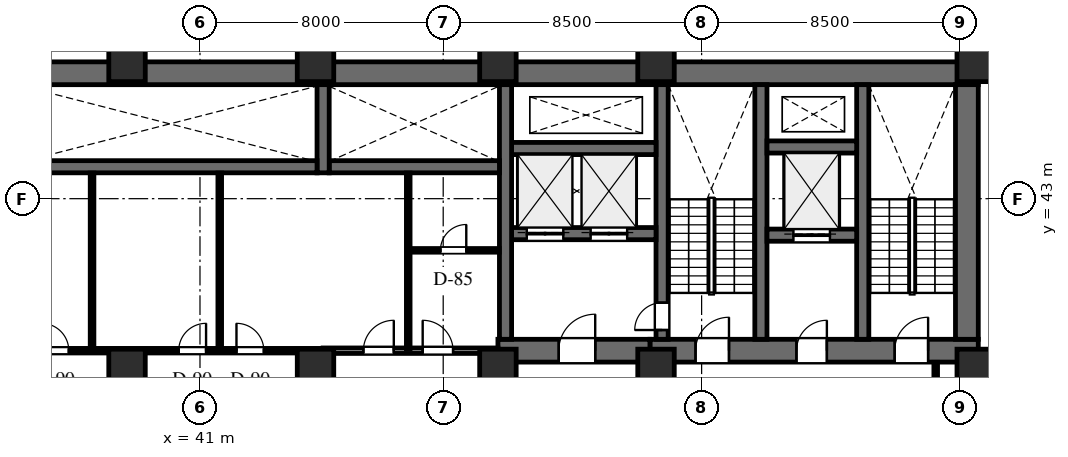
"""IFC4 building model, lengths in metres.
Left out: names, types, materials, properties, quantities, classifications, styles, units other than length and angle.
Written with IfcOpenShell. Run it as: python <this file> out.ifc"""

import sys

from ifc_helpers import new_model, si_unit, direction, frame, frame_2d, origin, origin_2d, place, context, subcontext, project, spatial, rectangle, extrude, element, fill, save


model = new_model("IFC4")
c1 = context("Model", 3, precision=1e-05, world=origin(), true_north=direction((0.0, 1.0)))
c2 = subcontext(c1, "Body", "Model", "MODEL_VIEW")
j1 = project(units=[si_unit("LENGTHUNIT", "METRE"), si_unit("PLANEANGLEUNIT", "RADIAN")], contexts=[c1])
p1 = place(None, origin())
s1 = spatial("IfcSite", under=j1, at=p1, CompositionType="ELEMENT")
p2 = place(p1, origin())
s2 = spatial("IfcBuilding", under=s1, at=p2, CompositionType="ELEMENT")
p3 = place(p2, frame((0.0, 0.0, 45.5)))
s3 = spatial("IfcBuildingStorey", under=s2, at=p3, CompositionType="ELEMENT", Elevation=45.5)
p4 = place(p3, frame((22.9, 47.125, 0.0), z_axis=(0.0, 0.0, 1.0), x_axis=(1.0, 0.0, 0.0)))
e1 = element("IfcWall", 1, at=p4, inside=s3, PredefinedType="SHEAR", context=c2, shape_type="SweptSolid", body=[
    extrude(rectangle(XDim=43.7, YDim=0.75, at=frame_2d((21.85, 0.0))), origin(), (0.0, 0.0, 1.0), 4.0),
])
p5 = place(p3, frame((55.8, 38.0, 0.0), z_axis=(0.0, 0.0, 1.0), x_axis=(1.0, 0.0, 0.0)))
e2 = element("IfcWall", 2, at=p5, inside=s3, PredefinedType="SHEAR", context=c2, shape_type="SweptSolid", body=[
    extrude(rectangle(XDim=10.8, YDim=0.75, at=frame_2d((5.4, 0.0))), origin(), (0.0, 0.0, 1.0), 4.0),
])
p6 = place(p5, frame((1.5, 0.0, 0.0)))
e3 = element("IfcOpeningElement", 3, at=p6, cuts=e2, PredefinedType="OPENING", context=c2, shape_type="SweptSolid", body=[
    extrude(rectangle(XDim=1.1, YDim=2.2, at=frame_2d((0.55, 1.1))), frame((0.0, 0.385, 0.0), z_axis=(0.0, -1.0, 0.0), x_axis=(1.0, 0.0, 0.0)), (0.0, 0.0, 1.0), 0.77),
])
p7 = place(p5, frame((4.82, 0.0, 0.0)))
e4 = element("IfcOpeningElement", 4, at=p7, cuts=e2, PredefinedType="OPENING", context=c2, shape_type="SweptSolid", body=[
    extrude(rectangle(XDim=1.0, YDim=2.15, at=frame_2d((0.5, 1.075))), frame((0.0, 0.385, 0.0), z_axis=(0.0, -1.0, 0.0), x_axis=(1.0, 0.0, 0.0)), (0.0, 0.0, 1.0), 0.77),
])
p8 = place(p5, frame((8.05, 0.0, 0.0)))
e5 = element("IfcOpeningElement", 5, at=p8, cuts=e2, PredefinedType="OPENING", context=c2, shape_type="SweptSolid", body=[
    extrude(rectangle(XDim=1.1, YDim=2.2, at=frame_2d((0.55, 1.1))), frame((0.0, 0.385, 0.0), z_axis=(0.0, -1.0, 0.0), x_axis=(1.0, 0.0, 0.0)), (0.0, 0.0, 1.0), 0.77),
])
p9 = place(p3, frame((66.225, 38.375, 0.0), z_axis=(0.0, 0.0, 1.0), x_axis=(0.0, 1.0, 0.0)))
e6 = element("IfcWall", 6, at=p9, inside=s3, PredefinedType="SHEAR", context=c2, shape_type="SweptSolid", body=[
    extrude(rectangle(XDim=8.375, YDim=0.75, at=frame_2d((4.188, 0.0))), origin(), (0.0, 0.0, 1.0), 4.0),
])
for number, where, z_axis, x_axis in (
    (7, (62.8, 38.375, 0.0), (0.0, 0.0, 1.0), (0.0, 1.0, 0.0)),
    (8, (59.45, 38.375, 0.0), (0.0, 0.0, 1.0), (0.0, 1.0, 0.0)),
):
    element("IfcWall", number, at=place(p3, frame(where, z_axis=z_axis, x_axis=x_axis)), inside=s3, PredefinedType="SHEAR", context=c2, shape_type="SweptSolid", body=[
        extrude(rectangle(XDim=8.375, YDim=0.4, at=frame_2d((4.188, 0.0))), origin(), (0.0, 0.0, 1.0), 4.0),
    ])
p10 = place(p3, frame((56.2, 38.375, 0.0), z_axis=(0.0, 0.0, 1.0), x_axis=(0.0, 1.0, 0.0)))
e9 = element("IfcWall", 9, at=p10, inside=s3, PredefinedType="SHEAR", context=c2, shape_type="SweptSolid", body=[
    extrude(rectangle(XDim=8.375, YDim=0.4, at=frame_2d((4.188, 0.0))), origin(), (0.0, 0.0, 1.0), 4.0),
])
p11 = place(p10, frame((0.305, 0.0, 0.0)))
e10 = element("IfcOpeningElement", 10, at=p11, cuts=e9, PredefinedType="OPENING", context=c2, shape_type="SweptSolid", body=[
    extrude(rectangle(XDim=0.9, YDim=2.15, at=frame_2d((0.45, 1.075))), frame((0.0, 0.21, 0.0), z_axis=(0.0, -1.0, 0.0), x_axis=(1.0, 0.0, 0.0)), (0.0, 0.0, 1.0), 0.42),
])
p12 = place(p3, frame((59.65, 41.8, 0.0), z_axis=(0.0, 0.0, 1.0), x_axis=(1.0, 0.0, 0.0)))
e11 = element("IfcWall", 11, at=p12, inside=s3, PredefinedType="SHEAR", context=c2, shape_type="SweptSolid", body=[
    extrude(rectangle(XDim=2.95, YDim=0.4, at=frame_2d((1.475, 0.0))), origin(), (0.0, 0.0, 1.0), 4.0),
])
p13 = place(p12, frame((0.87, 0.0, 0.0)))
e12 = element("IfcOpeningElement", 12, at=p13, cuts=e11, PredefinedType="OPENING", context=c2, shape_type="SweptSolid", body=[
    extrude(rectangle(XDim=1.2, YDim=2.2, at=frame_2d((0.6, 1.1))), frame((0.0, 0.21, 0.0), z_axis=(0.0, -1.0, 0.0), x_axis=(1.0, 0.0, 0.0)), (0.0, 0.0, 1.0), 0.42),
])
p14 = place(p3, frame((59.65, 44.7, 0.0), z_axis=(0.0, 0.0, 1.0), x_axis=(1.0, 0.0, 0.0)))
e13 = element("IfcWall", 13, at=p14, inside=s3, PredefinedType="SHEAR", context=c2, shape_type="SweptSolid", body=[
    extrude(rectangle(XDim=2.95, YDim=0.4, at=frame_2d((1.475, 0.0))), origin(), (0.0, 0.0, 1.0), 4.0),
])
p15 = place(p3, frame((50.8, 38.0, 0.0), z_axis=(0.0, 0.0, 1.0), x_axis=(1.0, 0.0, 0.0)))
e14 = element("IfcWall", 14, at=p15, inside=s3, PredefinedType="SHEAR", context=c2, shape_type="SweptSolid", body=[
    extrude(rectangle(XDim=5.0, YDim=0.75, at=frame_2d((2.5, 0.0))), origin(), (0.0, 0.0, 1.0), 4.0),
])
p16 = place(p15, frame((2.0, 0.0, 0.0)))
e15 = element("IfcOpeningElement", 15, at=p16, cuts=e14, PredefinedType="OPENING", context=c2, shape_type="SweptSolid", body=[
    extrude(rectangle(XDim=1.2, YDim=2.2, at=frame_2d((0.6, 1.1))), frame((0.0, 0.385, 0.0), z_axis=(0.0, -1.0, 0.0), x_axis=(1.0, 0.0, 0.0)), (0.0, 0.0, 1.0), 0.77),
])
p17 = place(p3, frame((51.25, 41.85, 0.0), z_axis=(0.0, 0.0, 1.0), x_axis=(1.0, 0.0, 0.0)))
e16 = element("IfcWall", 16, at=p17, inside=s3, PredefinedType="SHEAR", context=c2, shape_type="SweptSolid", body=[
    extrude(rectangle(XDim=4.75, YDim=0.4, at=frame_2d((2.375, 0.0))), origin(), (0.0, 0.0, 1.0), 4.0),
])
p18 = place(p17, frame((0.5, 0.0, 0.0)))
e17 = element("IfcOpeningElement", 17, at=p18, cuts=e16, PredefinedType="OPENING", context=c2, shape_type="SweptSolid", body=[
    extrude(rectangle(XDim=1.2, YDim=2.2, at=frame_2d((0.6, 1.1))), frame((0.0, 0.21, 0.0), z_axis=(0.0, -1.0, 0.0), x_axis=(1.0, 0.0, 0.0)), (0.0, 0.0, 1.0), 0.42),
])
p19 = place(p17, frame((2.6, 0.0, 0.0)))
e18 = element("IfcOpeningElement", 18, at=p19, cuts=e16, PredefinedType="OPENING", context=c2, shape_type="SweptSolid", body=[
    extrude(rectangle(XDim=1.2, YDim=2.2, at=frame_2d((0.6, 1.1))), frame((0.0, 0.21, 0.0), z_axis=(0.0, -1.0, 0.0), x_axis=(1.0, 0.0, 0.0)), (0.0, 0.0, 1.0), 0.42),
])
p20 = place(p3, frame((51.25, 44.65, 0.0), z_axis=(0.0, 0.0, 1.0), x_axis=(1.0, 0.0, 0.0)))
e19 = element("IfcWall", 19, at=p20, inside=s3, PredefinedType="SHEAR", context=c2, shape_type="SweptSolid", body=[
    extrude(rectangle(XDim=4.75, YDim=0.4, at=frame_2d((2.375, 0.0))), origin(), (0.0, 0.0, 1.0), 4.0),
])
p21 = place(p3, frame((51.05, 38.375, 0.0), z_axis=(0.0, 0.0, 1.0), x_axis=(0.0, 1.0, 0.0)))
e20 = element("IfcWall", 20, at=p21, inside=s3, PredefinedType="SHEAR", context=c2, shape_type="SweptSolid", body=[
    extrude(rectangle(XDim=8.375, YDim=0.4, at=frame_2d((4.188, 0.0))), origin(), (0.0, 0.0, 1.0), 4.0),
])
p22 = place(p3, frame((45.25, 44.05, 0.0), z_axis=(0.0, 0.0, 1.0), x_axis=(1.0, 0.0, 0.0)))
e21 = element("IfcWall", 21, at=p22, inside=s3, PredefinedType="SHEAR", context=c2, shape_type="SweptSolid", body=[
    extrude(rectangle(XDim=5.6, YDim=0.4, at=frame_2d((2.8, 0.0))), origin(), (0.0, 0.0, 1.0), 4.0),
])
p23 = place(p3, frame((45.05, 43.85, 0.0), z_axis=(0.0, 0.0, 1.0), x_axis=(0.0, 1.0, 0.0)))
e22 = element("IfcWall", 22, at=p23, inside=s3, PredefinedType="SHEAR", context=c2, shape_type="SweptSolid", body=[
    extrude(rectangle(XDim=2.9, YDim=0.4, at=frame_2d((1.45, 0.0))), origin(), (0.0, 0.0, 1.0), 4.0),
])
p24 = place(p3, frame((35.2, 44.05, 0.0), z_axis=(0.0, 0.0, 1.0), x_axis=(1.0, 0.0, 0.0)))
e23 = element("IfcWall", 23, at=p24, inside=s3, PredefinedType="SHEAR", context=c2, shape_type="SweptSolid", body=[
    extrude(rectangle(XDim=9.65, YDim=0.4, at=frame_2d((4.825, 0.0))), origin(), (0.0, 0.0, 1.0), 4.0),
])
for number, where, z_axis, x_axis in (
    (24, (66.5, 47.55, 0.0), (0.0, 0.0, 1.0), (1.0, 0.0, 0.0)),
    (25, (56.0, 47.55, 0.0), (0.0, 0.0, 1.0), (1.0, 0.0, 0.0)),
    (26, (66.5, 37.35, 0.0), (0.0, 0.0, 1.0), (1.0, 0.0, 0.0)),
    (27, (56.0, 37.35, 0.0), (0.0, 0.0, 1.0), (1.0, 0.0, 0.0)),
    (28, (50.8, 47.55, 0.0), (0.0, 0.0, 1.0), (1.0, 0.0, 0.0)),
    (29, (50.8, 37.35, 0.0), (0.0, 0.0, 1.0), (1.0, 0.0, 0.0)),
    (30, (44.8, 37.35, 0.0), (0.0, 0.0, 1.0), (1.0, 0.0, 0.0)),
    (31, (44.8, 47.55, 0.0), (0.0, 0.0, 1.0), (1.0, 0.0, 0.0)),
    (32, (38.6, 37.35, 0.0), (0.0, 0.0, 1.0), (1.0, 0.0, 0.0)),
    (33, (38.6, 47.55, 0.0), (0.0, 0.0, 1.0), (1.0, 0.0, 0.0)),
):
    element("IfcColumn", number, at=place(p3, frame(where, z_axis=z_axis, x_axis=x_axis)), inside=s3, PredefinedType="COLUMN", context=c2, shape_type="SweptSolid", body=[
        extrude(rectangle(XDim=1.2, YDim=1.4, at=origin_2d()), origin(), (0.0, 0.0, 1.0), 4.0),
    ])
p25 = place(p3, frame((68.375, 37.8, 0.0), z_axis=(0.0, 0.0, 1.0), x_axis=(-0.139174610616, -0.990267856572, 0.0)))
e34 = element("IfcWall", 34, at=p25, inside=s3, PredefinedType="STANDARD", context=c2, shape_type="SweptSolid", body=[
    extrude(rectangle(XDim=34.6, YDim=0.28, at=frame_2d((17.3, 0.0))), origin(), (0.0, 0.0, 1.0), 3.74),
])
p26 = place(p25, frame((8.36, 0.0, 0.0)))
e35 = element("IfcOpeningElement", 35, at=p26, cuts=e34, PredefinedType="OPENING", context=c2, shape_type="SweptSolid", body=[
    extrude(rectangle(XDim=1.0, YDim=2.15, at=frame_2d((0.5, 1.075))), frame((0.0, 0.15, 0.0), z_axis=(0.0, -1.0, 0.0), x_axis=(1.0, 0.0, 0.0)), (0.0, 0.0, 1.0), 0.3),
])
p27 = place(p25, frame((4.092, 0.0, 0.65)))
e36 = element("IfcOpeningElement", 36, at=p27, cuts=e34, PredefinedType="OPENING", context=c2, shape_type="SweptSolid", body=[
    extrude(rectangle(XDim=1.8, YDim=2.1, at=frame_2d((0.9, 1.05))), frame((0.0, 0.15, 0.0), z_axis=(0.0, -1.0, 0.0), x_axis=(1.0, 0.0, 0.0)), (0.0, 0.0, 1.0), 0.3),
])
p28 = place(p25, frame((20.903, 0.0, 0.65)))
e37 = element("IfcOpeningElement", 37, at=p28, cuts=e34, PredefinedType="OPENING", context=c2, shape_type="SweptSolid", body=[
    extrude(rectangle(XDim=1.8, YDim=2.1, at=frame_2d((0.9, 1.05))), frame((0.0, 0.15, 0.0), z_axis=(0.0, -1.0, 0.0), x_axis=(1.0, 0.0, 0.0)), (0.0, 0.0, 1.0), 0.3),
])
p29 = place(p3, frame((45.05, 38.0, 0.0), z_axis=(0.0, 0.0, 1.0), x_axis=(1.0, 0.0, 0.0)))
e38 = element("IfcWall", 38, at=p29, inside=s3, PredefinedType="STANDARD", context=c2, shape_type="SweptSolid", body=[
    extrude(rectangle(XDim=5.75, YDim=0.18, at=frame_2d((2.875, 0.0))), origin(), (0.0, 0.0, 1.0), 2.813),
])
p30 = place(p29, frame((1.325, 0.0, 0.0)))
e39 = element("IfcOpeningElement", 39, at=p30, cuts=e38, PredefinedType="OPENING", context=c2, shape_type="SweptSolid", body=[
    extrude(rectangle(XDim=1.0, YDim=2.15, at=frame_2d((0.5, 1.075))), frame((0.0, 0.1, 0.0), z_axis=(0.0, -1.0, 0.0), x_axis=(1.0, 0.0, 0.0)), (0.0, 0.0, 1.0), 0.2),
])
p31 = place(p29, frame((3.275, 0.0, 0.0)))
e40 = element("IfcOpeningElement", 40, at=p31, cuts=e38, PredefinedType="OPENING", context=c2, shape_type="SweptSolid", body=[
    extrude(rectangle(XDim=1.0, YDim=2.15, at=frame_2d((0.5, 1.075))), frame((0.0, 0.1, 0.0), z_axis=(0.0, -1.0, 0.0), x_axis=(1.0, 0.0, 0.0)), (0.0, 0.0, 1.0), 0.2),
])
p32 = place(p3, frame((47.85, 38.068, 0.0), z_axis=(0.0, 0.0, 1.0), x_axis=(0.0, 1.0, 0.0)))
e41 = element("IfcWall", 41, at=p32, inside=s3, PredefinedType="PARTITIONING", context=c2, shape_type="SweptSolid", body=[
    extrude(rectangle(XDim=5.774, YDim=0.12, at=frame_2d((2.887, 0.0))), origin(), (0.0, 0.0, 1.0), 3.74),
])
p33 = place(p3, frame((47.918, 41.3, 0.0), z_axis=(0.0, 0.0, 1.0), x_axis=(1.0, 0.0, 0.0)))
e42 = element("IfcWall", 42, at=p33, inside=s3, PredefinedType="PARTITIONING", context=c2, shape_type="SweptSolid", body=[
    extrude(rectangle(XDim=2.924, YDim=0.12, at=frame_2d((1.462, 0.0))), origin(), (0.0, 0.0, 1.0), 2.813),
])
p34 = place(p33, frame((0.991, 0.0, 0.0)))
e43 = element("IfcOpeningElement", 43, at=p34, cuts=e42, PredefinedType="OPENING", context=c2, shape_type="SweptSolid", body=[
    extrude(rectangle(XDim=0.85, YDim=2.1, at=frame_2d((0.425, 1.05))), frame((0.0, 0.07, 0.0), z_axis=(0.0, -1.0, 0.0), x_axis=(1.0, 0.0, 0.0)), (0.0, 0.0, 1.0), 0.14),
])
p35 = place(p3, frame((35.0, 38.0, 0.0), z_axis=(0.0, 0.0, 1.0), x_axis=(1.0, 0.0, 0.0)))
e44 = element("IfcWall", 44, at=p35, inside=s3, PredefinedType="PARTITIONING", context=c2, shape_type="SweptSolid", body=[
    extrude(rectangle(XDim=10.05, YDim=0.15, at=frame_2d((5.025, 0.0))), origin(), (0.0, 0.0, 1.0), 2.813),
])
p36 = place(p35, frame((0.785, 0.0, 0.0)))
e45 = element("IfcOpeningElement", 45, at=p36, cuts=e44, PredefinedType="OPENING", context=c2, shape_type="SweptSolid", body=[
    extrude(rectangle(XDim=0.9, YDim=2.1, at=frame_2d((0.45, 1.05))), frame((0.0, 0.085, 0.0), z_axis=(0.0, -1.0, 0.0), x_axis=(1.0, 0.0, 0.0)), (0.0, 0.0, 1.0), 0.17),
])
p37 = place(p35, frame((5.3, 0.0, 0.0)))
e46 = element("IfcOpeningElement", 46, at=p37, cuts=e44, PredefinedType="OPENING", context=c2, shape_type="SweptSolid", body=[
    extrude(rectangle(XDim=0.9, YDim=2.1, at=frame_2d((0.45, 1.05))), frame((0.0, 0.085, 0.0), z_axis=(0.0, -1.0, 0.0), x_axis=(1.0, 0.0, 0.0)), (0.0, 0.0, 1.0), 0.17),
])
p38 = place(p35, frame((7.2, 0.0, 0.0)))
e47 = element("IfcOpeningElement", 47, at=p38, cuts=e44, PredefinedType="OPENING", context=c2, shape_type="SweptSolid", body=[
    extrude(rectangle(XDim=0.9, YDim=2.1, at=frame_2d((0.45, 1.05))), frame((0.0, 0.085, 0.0), z_axis=(0.0, -1.0, 0.0), x_axis=(1.0, 0.0, 0.0)), (0.0, 0.0, 1.0), 0.17),
])
for number, where, z_axis, x_axis in (
    (48, (37.45, 38.068, 0.0), (0.0, 0.0, 1.0), (0.0, 1.0, 0.0)),
    (49, (41.65, 38.068, 0.0), (0.0, 0.0, 1.0), (0.0, 1.0, 0.0)),
):
    element("IfcWall", number, at=place(p3, frame(where, z_axis=z_axis, x_axis=x_axis)), inside=s3, PredefinedType="PARTITIONING", context=c2, shape_type="SweptSolid", body=[
        extrude(rectangle(XDim=5.774, YDim=0.12, at=frame_2d((2.887, 0.0))), origin(), (0.0, 0.0, 1.0), 3.74),
    ])
p39 = place(p3, frame((65.2, 34.4, 0.0), z_axis=(0.0, 0.0, 1.0), x_axis=(0.0, 1.0, 0.0)))
e50 = element("IfcWall", 50, at=p39, inside=s3, PredefinedType="PARTITIONING", context=c2, shape_type="SweptSolid", body=[
    extrude(rectangle(XDim=3.217, YDim=0.12, at=frame_2d((1.608, 0.0))), origin(), (0.0, 0.0, 1.0), 2.813),
])
p40 = place(p6, origin())
e51 = element("IfcDoor", 51, at=p40, inside=s3, OperationType="SINGLE_SWING_RIGHT", PredefinedType="DOOR", context=c2, shape_type="SweptSolid", body=[
    extrude(rectangle(XDim=1.1, YDim=2.2, at=frame_2d((0.55, 1.1))), frame((0.0, 0.025, 0.0), z_axis=(0.0, -1.0, 0.0), x_axis=(1.0, 0.0, 0.0)), (0.0, 0.0, 1.0), 0.05),
])
fill(e3, e51)
p41 = place(p7, origin())
e52 = element("IfcDoor", 52, at=p41, inside=s3, OperationType="SINGLE_SWING_RIGHT", PredefinedType="DOOR", context=c2, shape_type="SweptSolid", body=[
    extrude(rectangle(XDim=1.0, YDim=2.15, at=frame_2d((0.5, 1.075))), frame((0.0, 0.025, 0.0), z_axis=(0.0, -1.0, 0.0), x_axis=(1.0, 0.0, 0.0)), (0.0, 0.0, 1.0), 0.05),
])
fill(e4, e52)
p42 = place(p8, origin())
e53 = element("IfcDoor", 53, at=p42, inside=s3, OperationType="SINGLE_SWING_RIGHT", PredefinedType="DOOR", context=c2, shape_type="SweptSolid", body=[
    extrude(rectangle(XDim=1.1, YDim=2.2, at=frame_2d((0.55, 1.1))), frame((0.0, 0.025, 0.0), z_axis=(0.0, -1.0, 0.0), x_axis=(1.0, 0.0, 0.0)), (0.0, 0.0, 1.0), 0.05),
])
fill(e5, e53)
p43 = place(p16, origin())
e54 = element("IfcDoor", 54, at=p43, inside=s3, OperationType="SINGLE_SWING_RIGHT", PredefinedType="DOOR", context=c2, shape_type="SweptSolid", body=[
    extrude(rectangle(XDim=1.2, YDim=2.2, at=frame_2d((0.6, 1.1))), frame((0.0, 0.025, 0.0), z_axis=(0.0, -1.0, 0.0), x_axis=(1.0, 0.0, 0.0)), (0.0, 0.0, 1.0), 0.05),
])
fill(e15, e54)
p44 = place(p11, origin())
e55 = element("IfcDoor", 55, at=p44, inside=s3, OperationType="SINGLE_SWING_LEFT", PredefinedType="DOOR", context=c2, shape_type="SweptSolid", body=[
    extrude(rectangle(XDim=0.9, YDim=2.15, at=frame_2d((0.45, 1.075))), frame((0.0, 0.025, 0.0), z_axis=(0.0, -1.0, 0.0), x_axis=(1.0, 0.0, 0.0)), (0.0, 0.0, 1.0), 0.05),
])
fill(e10, e55)
p45 = place(p18, origin())
e56 = element("IfcDoor", 56, at=p45, inside=s3, OperationType="DOUBLE_DOOR_SLIDING", PredefinedType="DOOR", context=c2, shape_type="SweptSolid", body=[
    extrude(rectangle(XDim=1.2, YDim=2.2, at=frame_2d((0.6, 1.1))), frame((0.0, 0.025, 0.0), z_axis=(0.0, -1.0, 0.0), x_axis=(1.0, 0.0, 0.0)), (0.0, 0.0, 1.0), 0.05),
])
fill(e17, e56)
p46 = place(p19, origin())
e57 = element("IfcDoor", 57, at=p46, inside=s3, OperationType="DOUBLE_DOOR_SLIDING", PredefinedType="DOOR", context=c2, shape_type="SweptSolid", body=[
    extrude(rectangle(XDim=1.2, YDim=2.2, at=frame_2d((0.6, 1.1))), frame((0.0, 0.025, 0.0), z_axis=(0.0, -1.0, 0.0), x_axis=(1.0, 0.0, 0.0)), (0.0, 0.0, 1.0), 0.05),
])
fill(e18, e57)
p47 = place(p13, origin())
e58 = element("IfcDoor", 58, at=p47, inside=s3, OperationType="DOUBLE_DOOR_SLIDING", PredefinedType="DOOR", context=c2, shape_type="SweptSolid", body=[
    extrude(rectangle(XDim=1.2, YDim=2.2, at=frame_2d((0.6, 1.1))), frame((0.0, 0.025, 0.0), z_axis=(0.0, -1.0, 0.0), x_axis=(1.0, 0.0, 0.0)), (0.0, 0.0, 1.0), 0.05),
])
fill(e12, e58)
p48 = place(p30, origin())
e59 = element("IfcDoor", 59, at=p48, inside=s3, OperationType="SINGLE_SWING_RIGHT", PredefinedType="DOOR", context=c2, shape_type="SweptSolid", body=[
    extrude(rectangle(XDim=1.0, YDim=2.15, at=frame_2d((0.5, 1.075))), frame((0.0, 0.025, 0.0), z_axis=(0.0, -1.0, 0.0), x_axis=(1.0, 0.0, 0.0)), (0.0, 0.0, 1.0), 0.05),
])
fill(e39, e59)
p49 = place(p31, origin())
e60 = element("IfcDoor", 60, at=p49, inside=s3, OperationType="SINGLE_SWING_LEFT", PredefinedType="DOOR", context=c2, shape_type="SweptSolid", body=[
    extrude(rectangle(XDim=1.0, YDim=2.15, at=frame_2d((0.5, 1.075))), frame((0.0, 0.025, 0.0), z_axis=(0.0, -1.0, 0.0), x_axis=(1.0, 0.0, 0.0)), (0.0, 0.0, 1.0), 0.05),
])
fill(e40, e60)
p50 = place(p34, origin())
e61 = element("IfcDoor", 61, at=p50, inside=s3, OperationType="SINGLE_SWING_RIGHT", PredefinedType="DOOR", context=c2, shape_type="SweptSolid", body=[
    extrude(rectangle(XDim=0.85, YDim=2.1, at=frame_2d((0.425, 1.05))), frame((0.0, 0.025, 0.0), z_axis=(0.0, -1.0, 0.0), x_axis=(1.0, 0.0, 0.0)), (0.0, 0.0, 1.0), 0.05),
])
fill(e43, e61)
p51 = place(p36, origin())
e62 = element("IfcDoor", 62, at=p51, inside=s3, OperationType="SINGLE_SWING_LEFT", PredefinedType="DOOR", context=c2, shape_type="SweptSolid", body=[
    extrude(rectangle(XDim=0.9, YDim=2.1, at=frame_2d((0.45, 1.05))), frame((0.0, 0.025, 0.0), z_axis=(0.0, -1.0, 0.0), x_axis=(1.0, 0.0, 0.0)), (0.0, 0.0, 1.0), 0.05),
])
fill(e45, e62)
p52 = place(p37, origin())
e63 = element("IfcDoor", 63, at=p52, inside=s3, OperationType="SINGLE_SWING_RIGHT", PredefinedType="DOOR", context=c2, shape_type="SweptSolid", body=[
    extrude(rectangle(XDim=0.9, YDim=2.1, at=frame_2d((0.45, 1.05))), frame((0.0, 0.025, 0.0), z_axis=(0.0, -1.0, 0.0), x_axis=(1.0, 0.0, 0.0)), (0.0, 0.0, 1.0), 0.05),
])
fill(e46, e63)
p53 = place(p38, origin())
e64 = element("IfcDoor", 64, at=p53, inside=s3, OperationType="SINGLE_SWING_LEFT", PredefinedType="DOOR", context=c2, shape_type="SweptSolid", body=[
    extrude(rectangle(XDim=0.9, YDim=2.1, at=frame_2d((0.45, 1.05))), frame((0.0, 0.025, 0.0), z_axis=(0.0, -1.0, 0.0), x_axis=(1.0, 0.0, 0.0)), (0.0, 0.0, 1.0), 0.05),
])
fill(e47, e64)
save(model, sys.argv[1])
